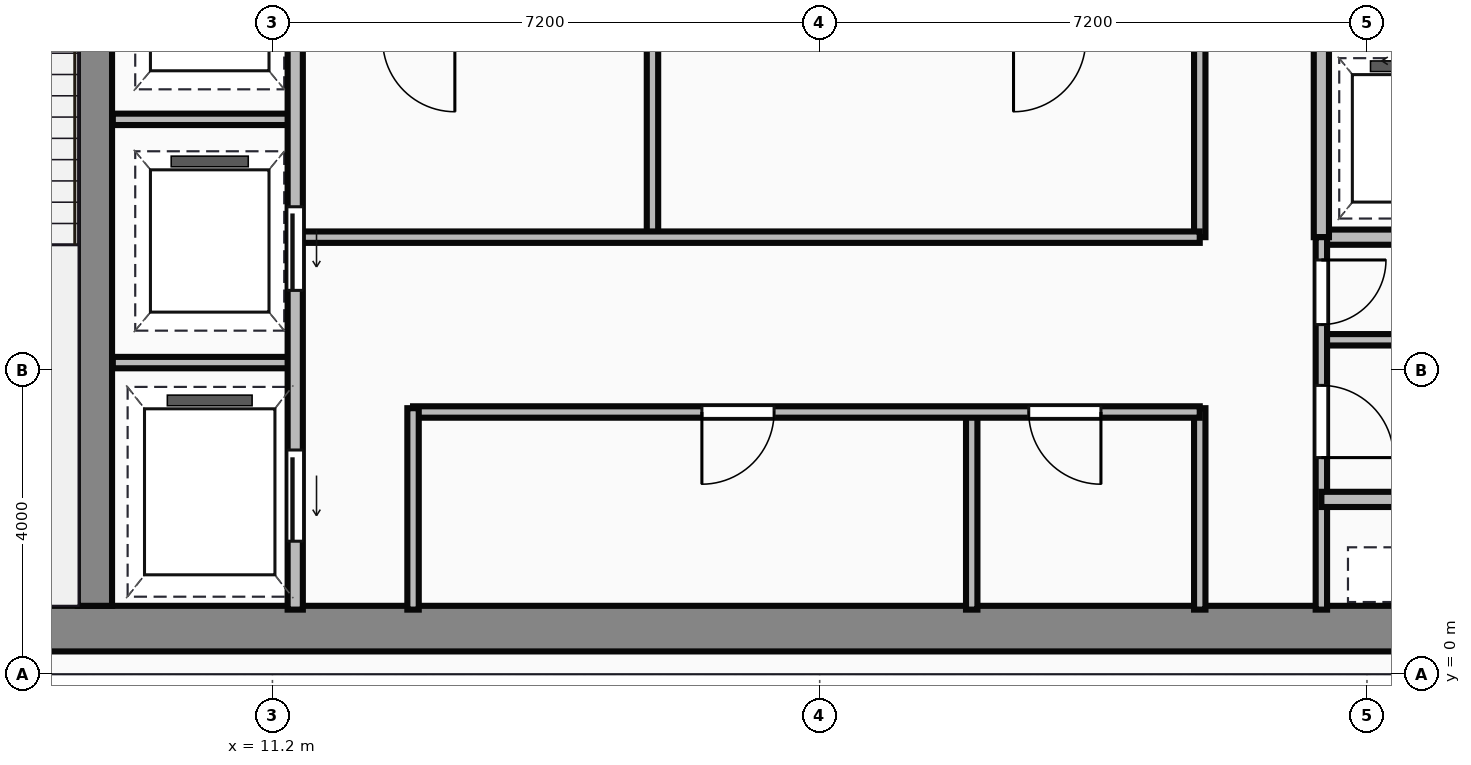
"""IFC4 building model, lengths in metres.
Left out: names, types, materials, properties, quantities, classifications, styles, units other than length and angle.
Written with IfcOpenShell. Run it as: python <this file> out.ifc"""

import sys

from ifc_helpers import new_model, si_unit, direction, frame, frame_2d, origin, place, context, subcontext, project, spatial, rectangle, extrude, source, transform, mapped, element, fill, save


model = new_model("IFC4")
c1 = context("Model", 3, precision=1e-05, world=origin(), true_north=direction((0.0, 1.0)))
c2 = subcontext(c1, "Body", "Model", "MODEL_VIEW")
j1 = project(units=[si_unit("LENGTHUNIT", "METRE"), si_unit("PLANEANGLEUNIT", "RADIAN")], contexts=[c1])
p1 = place(None, origin())
s1 = spatial("IfcSite", under=j1, at=p1, CompositionType="ELEMENT")
p2 = place(p1, origin())
s2 = spatial("IfcBuilding", under=s1, at=p2, CompositionType="ELEMENT")
p3 = place(p2, frame((0.0, 0.0, 214.15)))
s3 = spatial("IfcBuildingStorey", under=s2, at=p3, CompositionType="ELEMENT", Elevation=214.15)
m1 = source(origin(), c2, "Body", "SweptSolid", [
    extrude(rectangle(XDim=29.5, YDim=0.6, at=frame_2d((14.75, 0.0))), origin(), (0.0, 0.0, 1.0), 3.65),
])
p4 = place(p3, frame((4.5, 0.6, 0.0), z_axis=(0.0, 0.0, 1.0), x_axis=(1.0, 0.0, 0.0)))
e1 = element("IfcWall", 1, at=p4, inside=s3, PredefinedType="SHEAR", context=c2, shape_type="MappedRepresentation", body=[
    mapped(m1, transform((0.0, 0.0, 0.0))),
])
m2 = source(origin(), c2, "Body", "SweptSolid", [
    extrude(rectangle(XDim=12.5, YDim=0.45, at=frame_2d((6.25, 0.0))), origin(), (0.0, 0.0, 1.0), 3.65),
])
p5 = place(p3, frame((8.865, 0.9, 0.0), z_axis=(0.0, 0.0, 1.0), x_axis=(0.0, 1.0, 0.0)))
e2 = element("IfcWall", 2, at=p5, inside=s3, PredefinedType="SHEAR", context=c2, shape_type="MappedRepresentation", body=[
    mapped(m2, transform((0.0, 0.0, 0.0))),
])
m3 = source(origin(), c2, "Body", "SweptSolid", [
    extrude(rectangle(XDim=9.6, YDim=0.2, at=frame_2d((4.8, 0.0))), origin(), (0.0, 0.0, 1.0), 3.4),
])
p6 = place(p3, frame((11.5, 0.85, 0.0), z_axis=(0.0, 0.0, 1.0), x_axis=(0.0, 1.0, 0.0)))
e3 = element("IfcWall", 3, at=p6, inside=s3, PredefinedType="PARTITIONING", context=c2, shape_type="MappedRepresentation", body=[
    mapped(m3, transform((0.0, 0.0, 0.0))),
])
p7 = place(p6, frame((4.2, 0.0, 0.0)))
e4 = element("IfcOpeningElement", 4, at=p7, cuts=e3, PredefinedType="OPENING", context=c2, shape_type="SweptSolid", body=[
    extrude(rectangle(XDim=1.1, YDim=2.15, at=frame_2d((0.55, 1.075))), frame((0.0, 0.11, 0.0), z_axis=(0.0, -1.0, 0.0), x_axis=(1.0, 0.0, 0.0)), (0.0, 0.0, 1.0), 0.22),
])
p8 = place(p6, frame((0.9, 0.0, 0.0)))
e5 = element("IfcOpeningElement", 5, at=p8, cuts=e3, PredefinedType="OPENING", context=c2, shape_type="SweptSolid", body=[
    extrude(rectangle(XDim=1.2, YDim=2.15, at=frame_2d((0.6, 1.075))), frame((0.0, 0.11, 0.0), z_axis=(0.0, -1.0, 0.0), x_axis=(1.0, 0.0, 0.0)), (0.0, 0.0, 1.0), 0.22),
])
m4 = source(origin(), c2, "Body", "SweptSolid", [
    extrude(rectangle(XDim=2.4, YDim=0.15, at=frame_2d((1.2, 0.0))), origin(), (0.0, 0.0, 1.0), 3.4),
])
for number, where, z_axis, x_axis in (
    (6, (9.1, 4.1, 0.0), (0.0, 0.0, 1.0), (1.0, 0.0, 0.0)),
    (7, (9.1, 7.3, 0.0), (0.0, 0.0, 1.0), (1.0, 0.0, 0.0)),
):
    element("IfcWall", number, at=place(p3, frame(where, z_axis=z_axis, x_axis=x_axis)), inside=s3, PredefinedType="PARTITIONING", context=c2, shape_type="MappedRepresentation", body=[
        mapped(m4, transform((0.0, 0.0, 0.0))),
    ])
m5 = source(origin(), c2, "Body", "SweptSolid", [
    extrude(rectangle(XDim=2.65, YDim=0.15, at=frame_2d((1.325, 0.0))), origin(), (0.0, 0.0, 1.0), 3.4),
])
p9 = place(p3, frame((13.05, 0.85, 0.0), z_axis=(0.0, 0.0, 1.0), x_axis=(0.0, 1.0, 0.0)))
e8 = element("IfcWall", 8, at=p9, inside=s3, PredefinedType="PARTITIONING", context=c2, shape_type="MappedRepresentation", body=[
    mapped(m5, transform((0.0, 0.0, 0.0))),
])
m6 = source(origin(), c2, "Body", "SweptSolid", [
    extrude(rectangle(XDim=10.35, YDim=0.15, at=frame_2d((5.175, 0.0))), origin(), (0.0, 0.0, 1.0), 3.4),
])
p10 = place(p3, frame((13.05, 3.45, 0.0), z_axis=(0.0, 0.0, 1.0), x_axis=(1.0, 0.0, 0.0)))
e9 = element("IfcWall", 9, at=p10, inside=s3, PredefinedType="PARTITIONING", context=c2, shape_type="MappedRepresentation", body=[
    mapped(m6, transform((0.0, 0.0, 0.0))),
])
p11 = place(p10, frame((3.8, 0.0, 0.0)))
e10 = element("IfcOpeningElement", 10, at=p11, cuts=e9, PredefinedType="OPENING", context=c2, shape_type="SweptSolid", body=[
    extrude(rectangle(XDim=0.95, YDim=2.15, at=frame_2d((0.475, 1.075))), frame((0.0, 0.085, 0.0), z_axis=(0.0, -1.0, 0.0), x_axis=(1.0, 0.0, 0.0)), (0.0, 0.0, 1.0), 0.17),
])
p12 = place(p10, frame((8.1, 0.0, 0.0)))
e11 = element("IfcOpeningElement", 11, at=p12, cuts=e9, PredefinedType="OPENING", context=c2, shape_type="SweptSolid", body=[
    extrude(rectangle(XDim=0.95, YDim=2.15, at=frame_2d((0.475, 1.075))), frame((0.0, 0.085, 0.0), z_axis=(0.0, -1.0, 0.0), x_axis=(1.0, 0.0, 0.0)), (0.0, 0.0, 1.0), 0.17),
])
p13 = place(p3, frame((23.4, 0.85, 0.0), z_axis=(0.0, 0.0, 1.0), x_axis=(0.0, 1.0, 0.0)))
e12 = element("IfcWall", 12, at=p13, inside=s3, PredefinedType="PARTITIONING", context=c2, shape_type="MappedRepresentation", body=[
    mapped(m5, transform((0.0, 0.0, 0.0))),
])
m7 = source(origin(), c2, "Body", "SweptSolid", [
    extrude(rectangle(XDim=2.6, YDim=0.15, at=frame_2d((1.3, 0.0))), origin(), (0.0, 0.0, 1.0), 3.4),
])
p14 = place(p3, frame((20.4, 0.85, 0.0), z_axis=(0.0, 0.0, 1.0), x_axis=(0.0, 1.0, 0.0)))
e13 = element("IfcWall", 13, at=p14, inside=s3, PredefinedType="PARTITIONING", context=c2, shape_type="MappedRepresentation", body=[
    mapped(m7, transform((0.0, 0.0, 0.0))),
])
m8 = source(origin(), c2, "Body", "SweptSolid", [
    extrude(rectangle(XDim=11.85, YDim=0.15, at=frame_2d((5.925, 0.0))), origin(), (0.0, 0.0, 1.0), 3.4),
])
p15 = place(p3, frame((11.55, 5.75, 0.0), z_axis=(0.0, 0.0, 1.0), x_axis=(1.0, 0.0, 0.0)))
e14 = element("IfcWall", 14, at=p15, inside=s3, PredefinedType="PARTITIONING", context=c2, shape_type="MappedRepresentation", body=[
    mapped(m8, transform((0.0, 0.0, 0.0))),
])
m9 = source(origin(), c2, "Body", "SweptSolid", [
    extrude(rectangle(XDim=2.6, YDim=0.15, at=frame_2d((1.3, 0.0))), origin(), (0.0, 0.0, 1.0), 3.4),
])
p16 = place(p3, frame((23.4, 5.75, 0.0), z_axis=(0.0, 0.0, 1.0), x_axis=(0.0, 1.0, 0.0)))
e15 = element("IfcWall", 15, at=p16, inside=s3, PredefinedType="PARTITIONING", context=c2, shape_type="MappedRepresentation", body=[
    mapped(m9, transform((0.0, 0.0, 0.0))),
])
m10 = source(origin(), c2, "Body", "SweptSolid", [
    extrude(rectangle(XDim=2.5, YDim=0.15, at=frame_2d((1.25, 0.0))), origin(), (0.0, 0.0, 1.0), 3.4),
])
p17 = place(p3, frame((16.2, 5.8, 0.0), z_axis=(0.0, 0.0, 1.0), x_axis=(0.0, 1.0, 0.0)))
e16 = element("IfcWall", 16, at=p17, inside=s3, PredefinedType="PARTITIONING", context=c2, shape_type="MappedRepresentation", body=[
    mapped(m10, transform((0.0, 0.0, 0.0))),
])
m11 = source(origin(), c2, "Body", "SweptSolid", [
    extrude(rectangle(XDim=4.55, YDim=0.2, at=frame_2d((2.275, 0.0))), origin(), (0.0, 0.0, 1.0), 3.4),
])
p18 = place(p3, frame((25.0, 5.75, 0.0), z_axis=(0.0, 0.0, 1.0), x_axis=(1.0, 0.0, 0.0)))
e17 = element("IfcWall", 17, at=p18, inside=s3, PredefinedType="PARTITIONING", context=c2, shape_type="MappedRepresentation", body=[
    mapped(m11, transform((0.0, 0.0, 0.0))),
])
m12 = source(origin(), c2, "Body", "SweptSolid", [
    extrude(rectangle(XDim=2.6, YDim=0.2, at=frame_2d((1.3, 0.0))), origin(), (0.0, 0.0, 1.0), 3.4),
])
p19 = place(p3, frame((25.0, 5.75, 0.0), z_axis=(0.0, 0.0, 1.0), x_axis=(0.0, 1.0, 0.0)))
e18 = element("IfcWall", 18, at=p19, inside=s3, PredefinedType="PARTITIONING", context=c2, shape_type="MappedRepresentation", body=[
    mapped(m12, transform((0.0, 0.0, 0.0))),
])
m13 = source(origin(), c2, "Body", "SweptSolid", [
    extrude(rectangle(XDim=4.9, YDim=0.15, at=frame_2d((2.45, 0.0))), origin(), (0.0, 0.0, 1.0), 3.4),
])
p20 = place(p3, frame((25.0, 0.85, 0.0), z_axis=(0.0, 0.0, 1.0), x_axis=(0.0, 1.0, 0.0)))
e19 = element("IfcWall", 19, at=p20, inside=s3, PredefinedType="PARTITIONING", context=c2, shape_type="MappedRepresentation", body=[
    mapped(m13, transform((0.0, 0.0, 0.0))),
])
p21 = place(p20, frame((2.0, 0.0, 0.0)))
e20 = element("IfcOpeningElement", 20, at=p21, cuts=e19, PredefinedType="OPENING", context=c2, shape_type="SweptSolid", body=[
    extrude(rectangle(XDim=0.95, YDim=2.15, at=frame_2d((0.475, 1.075))), frame((0.0, 0.085, 0.0), z_axis=(0.0, -1.0, 0.0), x_axis=(1.0, 0.0, 0.0)), (0.0, 0.0, 1.0), 0.17),
])
p22 = place(p20, frame((3.75, 0.0, 0.0)))
e21 = element("IfcOpeningElement", 21, at=p22, cuts=e19, PredefinedType="OPENING", context=c2, shape_type="SweptSolid", body=[
    extrude(rectangle(XDim=0.85, YDim=2.15, at=frame_2d((0.425, 1.075))), frame((0.0, 0.085, 0.0), z_axis=(0.0, -1.0, 0.0), x_axis=(1.0, 0.0, 0.0)), (0.0, 0.0, 1.0), 0.17),
])
m14 = source(origin(), c2, "Body", "SweptSolid", [
    extrude(rectangle(XDim=2.4, YDim=0.2, at=frame_2d((1.2, 0.0))), origin(), (0.0, 0.0, 1.0), 3.4),
])
p23 = place(p3, frame((25.0, 2.3, 0.0), z_axis=(0.0, 0.0, 1.0), x_axis=(1.0, 0.0, 0.0)))
e22 = element("IfcWall", 22, at=p23, inside=s3, PredefinedType="PARTITIONING", context=c2, shape_type="MappedRepresentation", body=[
    mapped(m14, transform((0.0, 0.0, 0.0))),
])
m15 = source(origin(), c2, "Body", "SweptSolid", [
    extrude(rectangle(XDim=4.55, YDim=0.15, at=frame_2d((2.275, 0.0))), origin(), (0.0, 0.0, 1.0), 3.4),
])
p24 = place(p3, frame((25.0, 4.4, 0.0), z_axis=(0.0, 0.0, 1.0), x_axis=(1.0, 0.0, 0.0)))
e23 = element("IfcWall", 23, at=p24, inside=s3, PredefinedType="PARTITIONING", context=c2, shape_type="MappedRepresentation", body=[
    mapped(m15, transform((0.0, 0.0, 0.0))),
])
m16 = source(origin(), c2, "Body", "SweptSolid", [
    extrude(rectangle(XDim=1.1, YDim=2.15, at=frame_2d((0.55, 1.075))), frame((0.0, 0.025, 0.0), z_axis=(0.0, -1.0, 0.0), x_axis=(1.0, 0.0, 0.0)), (0.0, 0.0, 1.0), 0.05),
])
p25 = place(p7, frame((1.1, 0.0, 0.0), z_axis=(0.0, 0.0, 1.0), x_axis=(-1.0, 0.0, 0.0)))
e24 = element("IfcDoor", 24, at=p25, inside=s3, OperationType="SLIDING_TO_LEFT", PredefinedType="DOOR", context=c2, shape_type="MappedRepresentation", body=[
    mapped(m16, transform((0.0, 0.0, 0.0))),
])
fill(e4, e24)
m17 = source(origin(), c2, "Body", "SweptSolid", [
    extrude(rectangle(XDim=1.2, YDim=2.15, at=frame_2d((0.6, 1.075))), frame((0.0, 0.025, 0.0), z_axis=(0.0, -1.0, 0.0), x_axis=(1.0, 0.0, 0.0)), (0.0, 0.0, 1.0), 0.05),
])
p26 = place(p8, frame((1.2, 0.0, 0.0), z_axis=(0.0, 0.0, 1.0), x_axis=(-1.0, 0.0, 0.0)))
e25 = element("IfcDoor", 25, at=p26, inside=s3, OperationType="SLIDING_TO_LEFT", PredefinedType="DOOR", context=c2, shape_type="MappedRepresentation", body=[
    mapped(m17, transform((0.0, 0.0, 0.0))),
])
fill(e5, e25)
m18 = source(origin(), c2, "Body", "SweptSolid", [
    extrude(rectangle(XDim=0.95, YDim=2.15, at=frame_2d((0.475, 1.075))), frame((0.0, 0.025, 0.0), z_axis=(0.0, -1.0, 0.0), x_axis=(1.0, 0.0, 0.0)), (0.0, 0.0, 1.0), 0.05),
])
p27 = place(p11, origin())
e26 = element("IfcDoor", 26, at=p27, inside=s3, OperationType="SINGLE_SWING_LEFT", PredefinedType="DOOR", context=c2, shape_type="MappedRepresentation", body=[
    mapped(m18, transform((0.0, 0.0, 0.0))),
])
fill(e10, e26)
p28 = place(p12, origin())
e27 = element("IfcDoor", 27, at=p28, inside=s3, OperationType="SINGLE_SWING_RIGHT", PredefinedType="DOOR", context=c2, shape_type="MappedRepresentation", body=[
    mapped(m18, transform((0.0, 0.0, 0.0))),
])
fill(e11, e27)
p29 = place(p21, origin())
e28 = element("IfcDoor", 28, at=p29, inside=s3, OperationType="SINGLE_SWING_LEFT", PredefinedType="DOOR", context=c2, shape_type="MappedRepresentation", body=[
    mapped(m18, transform((0.0, 0.0, 0.0))),
])
fill(e20, e28)
m19 = source(origin(), c2, "Body", "SweptSolid", [
    extrude(rectangle(XDim=0.85, YDim=2.15, at=frame_2d((0.425, 1.075))), frame((0.0, 0.025, 0.0), z_axis=(0.0, -1.0, 0.0), x_axis=(1.0, 0.0, 0.0)), (0.0, 0.0, 1.0), 0.05),
])
p30 = place(p22, origin())
e29 = element("IfcDoor", 29, at=p30, inside=s3, OperationType="SINGLE_SWING_RIGHT", PredefinedType="DOOR", context=c2, shape_type="MappedRepresentation", body=[
    mapped(m19, transform((0.0, 0.0, 0.0))),
])
fill(e21, e29)
save(model, sys.argv[1])
